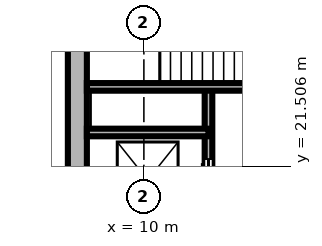
"""IFC4 building model, lengths in metres.
Left out: names, types, materials, properties, quantities, classifications, styles, units other than length and angle.
Written with IfcOpenShell. Run it as: python <this file> out.ifc"""

import sys

from ifc_helpers import new_model, si_unit, direction, frame, frame_2d, origin, place, context, subcontext, project, spatial, rectangle, extrude, element, fill, save


model = new_model("IFC4")
c1 = context("Model", 3, precision=1e-05, world=origin(), true_north=direction((0.0, 1.0)))
c2 = subcontext(c1, "Body", "Model", "MODEL_VIEW")
j1 = project(units=[si_unit("LENGTHUNIT", "METRE"), si_unit("PLANEANGLEUNIT", "RADIAN")], contexts=[c1])
p1 = place(None, origin())
s1 = spatial("IfcSite", under=j1, at=p1, CompositionType="ELEMENT")
p2 = place(p1, origin())
s2 = spatial("IfcBuilding", under=s1, at=p2, CompositionType="ELEMENT")
p3 = place(p2, frame((0.0, 0.0, 278.7)))
s3 = spatial("IfcBuildingStorey", under=s2, at=p3, CompositionType="ELEMENT", Elevation=278.7)
p4 = place(p3, frame((8.25, 27.5, 0.0), z_axis=(0.0, 0.0, 1.0), x_axis=(0.0, -1.0, 0.0)))
e1 = element("IfcWall", 1, at=p4, inside=s3, PredefinedType="SHEAR", context=c2, shape_type="SweptSolid", body=[
    extrude(rectangle(XDim=19.0, YDim=0.5, at=frame_2d((9.5, 0.0))), origin(), (0.0, 0.0, 1.0), 3.9),
])
p5 = place(p3, frame((8.5, 22.4, 0.0), z_axis=(0.0, 0.0, 1.0), x_axis=(1.0, 0.0, 0.0)))
e2 = element("IfcWall", 2, at=p5, inside=s3, PredefinedType="SHEAR", context=c2, shape_type="SweptSolid", body=[
    extrude(rectangle(XDim=3.2, YDim=0.2, at=frame_2d((1.6, 0.0))), origin(), (0.0, 0.0, 1.0), 3.58),
])
p6 = place(p3, frame((8.5, 23.6, 0.0), z_axis=(0.0, 0.0, 1.0), x_axis=(1.0, 0.0, 0.0)))
e3 = element("IfcWall", 3, at=p6, inside=s3, PredefinedType="SHEAR", context=c2, shape_type="SweptSolid", body=[
    extrude(rectangle(XDim=5.3, YDim=0.2, at=frame_2d((2.65, 0.0))), origin(), (0.0, 0.0, 1.0), 3.58),
])
p7 = place(p3, frame((11.7, 12.4, 0.0), z_axis=(0.0, 0.0, 1.0), x_axis=(0.0, 1.0, 0.0)))
e4 = element("IfcWall", 4, at=p7, inside=s3, PredefinedType="SHEAR", context=c2, shape_type="SweptSolid", body=[
    extrude(rectangle(XDim=11.2, YDim=0.2, at=frame_2d((5.6, 0.0))), origin(), (0.0, 0.0, 1.0), 3.58),
])
p8 = place(p7, frame((0.7, 0.0, 0.0)))
e5 = element("IfcOpeningElement", 5, at=p8, cuts=e4, PredefinedType="OPENING", context=c2, shape_type="SweptSolid", body=[
    extrude(rectangle(XDim=1.1, YDim=2.1, at=frame_2d((0.55, 1.05))), frame((0.0, 0.11, 0.0), z_axis=(0.0, -1.0, 0.0), x_axis=(1.0, 0.0, 0.0)), (0.0, 0.0, 1.0), 0.22),
])
p9 = place(p7, frame((3.2, 0.0, 0.0)))
e6 = element("IfcOpeningElement", 6, at=p9, cuts=e4, PredefinedType="OPENING", context=c2, shape_type="SweptSolid", body=[
    extrude(rectangle(XDim=1.1, YDim=2.1, at=frame_2d((0.55, 1.05))), frame((0.0, 0.11, 0.0), z_axis=(0.0, -1.0, 0.0), x_axis=(1.0, 0.0, 0.0)), (0.0, 0.0, 1.0), 0.22),
])
p10 = place(p7, frame((5.7, 0.0, 0.0)))
e7 = element("IfcOpeningElement", 7, at=p10, cuts=e4, PredefinedType="OPENING", context=c2, shape_type="SweptSolid", body=[
    extrude(rectangle(XDim=1.1, YDim=2.1, at=frame_2d((0.55, 1.05))), frame((0.0, 0.11, 0.0), z_axis=(0.0, -1.0, 0.0), x_axis=(1.0, 0.0, 0.0)), (0.0, 0.0, 1.0), 0.22),
])
p11 = place(p7, frame((8.2, 0.0, 0.0)))
e8 = element("IfcOpeningElement", 8, at=p11, cuts=e4, PredefinedType="OPENING", context=c2, shape_type="SweptSolid", body=[
    extrude(rectangle(XDim=1.1, YDim=2.1, at=frame_2d((0.55, 1.05))), frame((0.0, 0.11, 0.0), z_axis=(0.0, -1.0, 0.0), x_axis=(1.0, 0.0, 0.0)), (0.0, 0.0, 1.0), 0.22),
])
p12 = place(p11, origin())
e9 = element("IfcDoor", 9, at=p12, inside=s3, OperationType="DOUBLE_DOOR_SLIDING", PredefinedType="DOOR", context=c2, shape_type="SweptSolid", body=[
    extrude(rectangle(XDim=1.1, YDim=2.1, at=frame_2d((0.55, 1.05))), frame((0.0, 0.025, 0.0), z_axis=(0.0, -1.0, 0.0), x_axis=(1.0, 0.0, 0.0)), (0.0, 0.0, 1.0), 0.05),
])
fill(e8, e9)
save(model, sys.argv[1])
